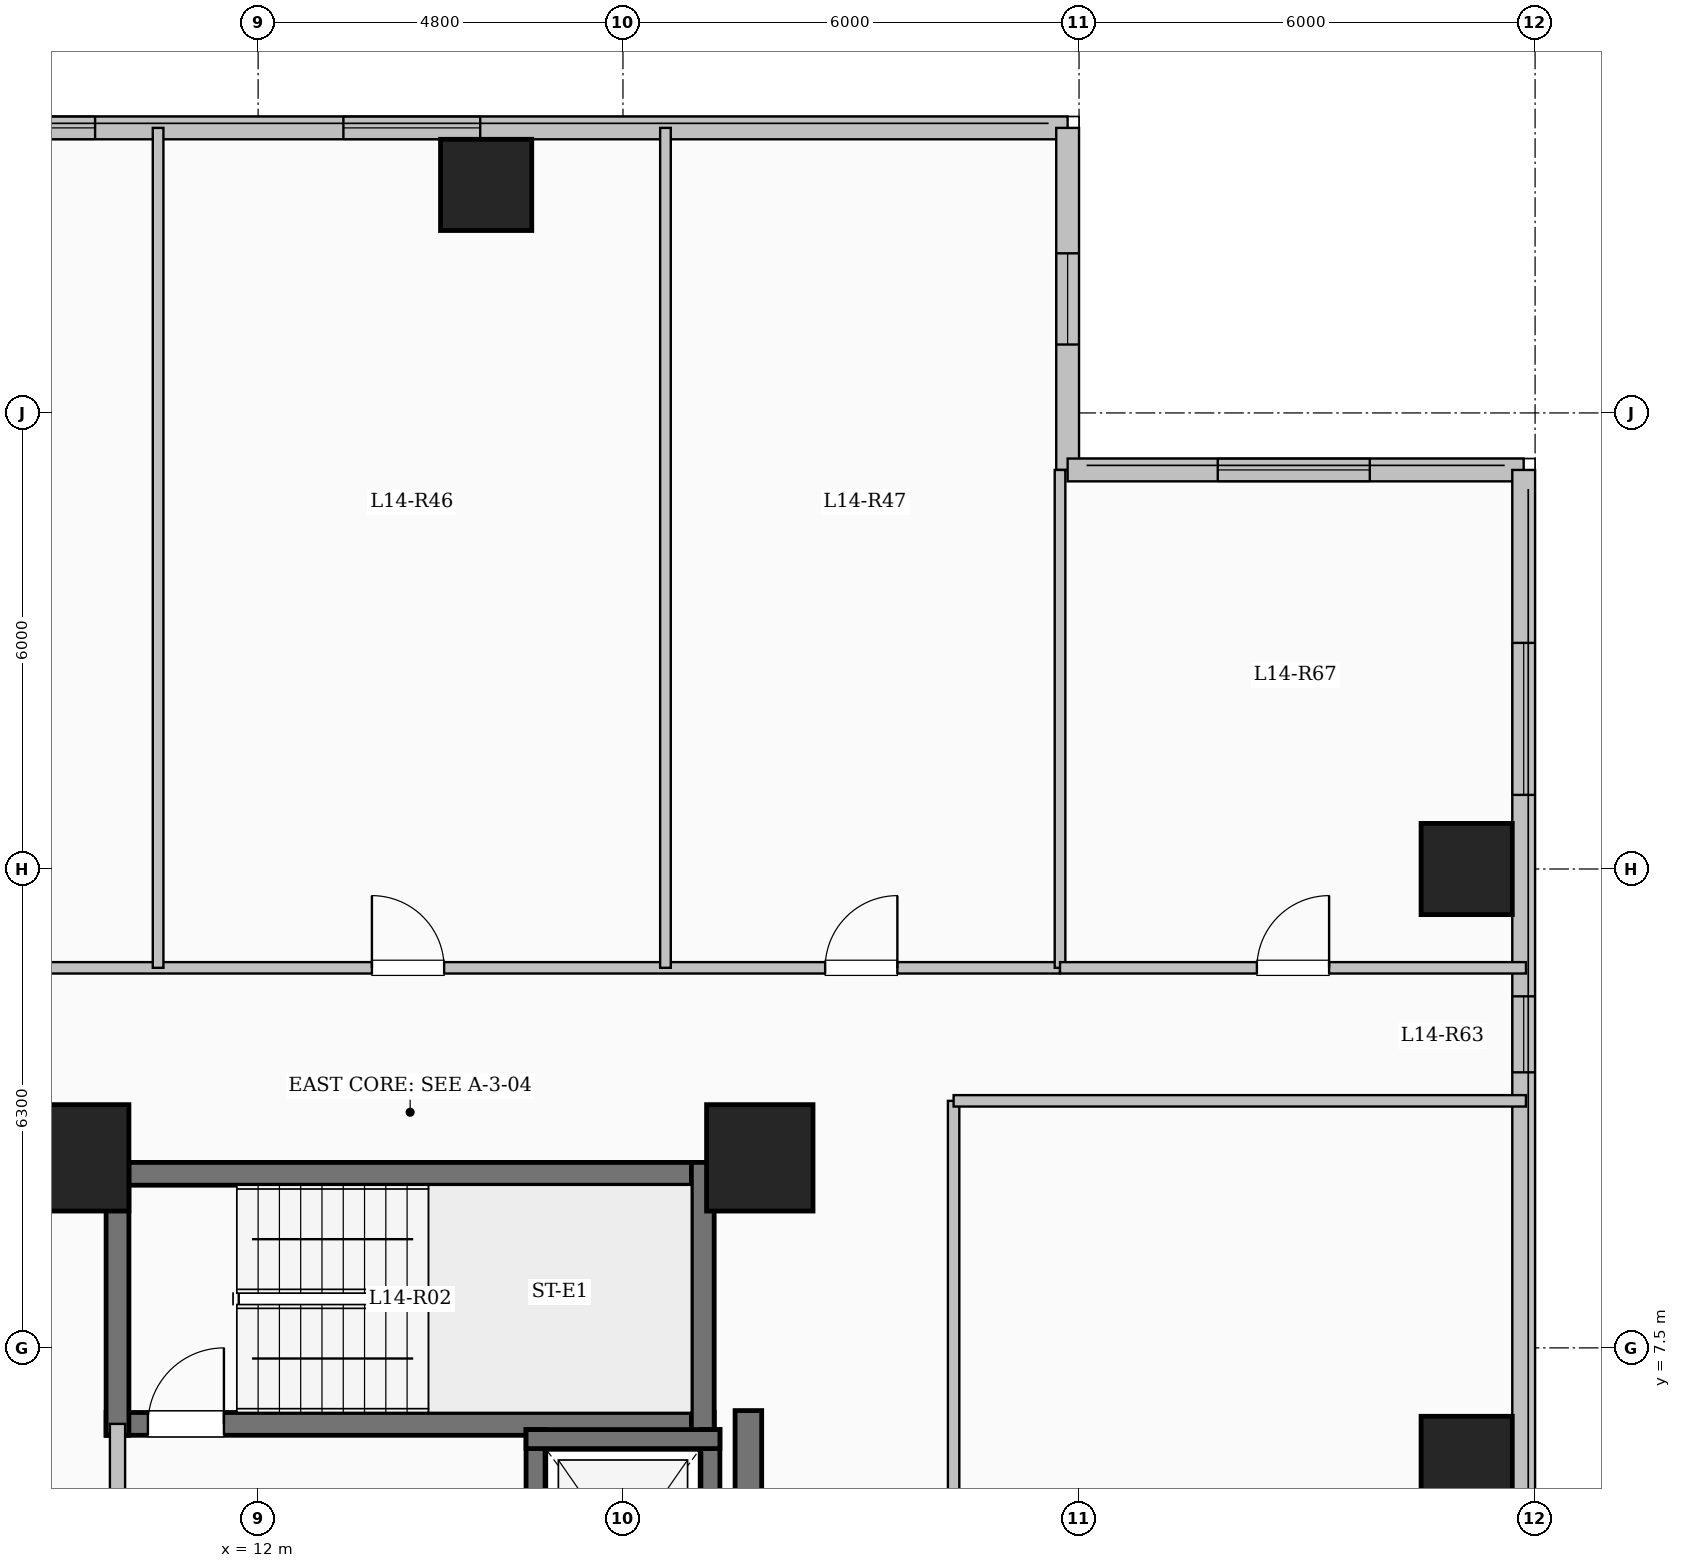
"""IFC4 building model, lengths in metres.
Left out: names, types, materials, properties, quantities, classifications, styles, units other than length and angle.
Written with IfcOpenShell. Run it as: python <this file> out.ifc"""

import sys

from ifc_helpers import new_model, si_unit, direction, frame, frame_2d, origin, origin_2d, place, context, subcontext, project, spatial, rectangle, extrude, element, fill, save


model = new_model("IFC4")
c1 = context("Model", 3, precision=1e-05, world=origin(), true_north=direction((0.0, 1.0)))
c2 = subcontext(c1, "Body", "Model", "MODEL_VIEW")
j1 = project(units=[si_unit("LENGTHUNIT", "METRE"), si_unit("PLANEANGLEUNIT", "RADIAN")], contexts=[c1])
p1 = place(None, origin())
s1 = spatial("IfcSite", under=j1, at=p1, CompositionType="ELEMENT")
p2 = place(p1, origin())
s2 = spatial("IfcBuilding", under=s1, at=p2, CompositionType="ELEMENT")
p3 = place(p2, frame((0.0, 0.0, 54.15)))
s3 = spatial("IfcBuildingStorey", under=s2, at=p3, CompositionType="ELEMENT", Elevation=54.15)
for number, where, z_axis, x_axis in (
    (1, (9.6, 10.0, 0.0), (0.0, 0.0, 1.0), (1.0, 0.0, 0.0)),
    (2, (18.6, 10.0, 0.0), (0.0, 0.0, 1.0), (1.0, 0.0, 0.0)),
):
    element("IfcColumn", number, at=place(p3, frame(where, z_axis=z_axis, x_axis=x_axis)), inside=s3, PredefinedType="COLUMN", context=c2, shape_type="SweptSolid", body=[
        extrude(rectangle(XDim=1.4, YDim=1.4, at=origin_2d()), origin(), (0.0, 0.0, 1.0), 3.35),
    ])
for number, where, z_axis, x_axis in (
    (3, (15.0, 22.8, 0.0), (0.0, 0.0, 1.0), (1.0, 0.0, 0.0)),
    (4, (27.9, 6.0, 0.0), (0.0, 0.0, 1.0), (1.0, 0.0, 0.0)),
    (5, (27.9, 13.8, 0.0), (0.0, 0.0, 1.0), (1.0, 0.0, 0.0)),
):
    element("IfcColumn", number, at=place(p3, frame(where, z_axis=z_axis, x_axis=x_axis)), inside=s3, PredefinedType="COLUMN", context=c2, shape_type="SweptSolid", body=[
        extrude(rectangle(XDim=1.2, YDim=1.2, at=origin_2d()), origin(), (0.0, 0.0, 1.0), 3.35),
    ])
p4 = place(p3, frame((7.35, 23.55, 0.0), z_axis=(0.0, 0.0, 1.0), x_axis=(1.0, 0.0, 0.0)))
e6 = element("IfcWall", 6, at=p4, inside=s3, PredefinedType="SOLIDWALL", context=c2, shape_type="SweptSolid", body=[
    extrude(rectangle(XDim=15.3, YDim=0.3, at=frame_2d((7.65, 0.0))), origin(), (0.0, 0.0, 1.0), 3.1),
])
p5 = place(p4, frame((0.705, 0.0, 0.9)))
e7 = element("IfcOpeningElement", 7, at=p5, cuts=e6, PredefinedType="OPENING", context=c2, shape_type="SweptSolid", body=[
    extrude(rectangle(XDim=1.8, YDim=1.65, at=frame_2d((0.9, 0.825))), frame((0.0, 0.16, 0.0), z_axis=(0.0, -1.0, 0.0), x_axis=(1.0, 0.0, 0.0)), (0.0, 0.0, 1.0), 0.32),
])
p6 = place(p4, frame((5.772, 0.0, 0.9)))
e8 = element("IfcOpeningElement", 8, at=p6, cuts=e6, PredefinedType="OPENING", context=c2, shape_type="SweptSolid", body=[
    extrude(rectangle(XDim=1.8, YDim=1.65, at=frame_2d((0.9, 0.825))), frame((0.0, 0.16, 0.0), z_axis=(0.0, -1.0, 0.0), x_axis=(1.0, 0.0, 0.0)), (0.0, 0.0, 1.0), 0.32),
])
p7 = place(p3, frame((22.65, 23.55, 0.0), z_axis=(0.0, 0.0, 1.0), x_axis=(0.0, -1.0, 0.0)))
e9 = element("IfcWall", 9, at=p7, inside=s3, PredefinedType="SOLIDWALL", context=c2, shape_type="SweptSolid", body=[
    extrude(rectangle(XDim=4.5, YDim=0.3, at=frame_2d((2.25, 0.0))), origin(), (0.0, 0.0, 1.0), 3.1),
])
p8 = place(p7, frame((1.65, 0.0, 0.95)))
e10 = element("IfcOpeningElement", 10, at=p8, cuts=e9, PredefinedType="OPENING", context=c2, shape_type="SweptSolid", body=[
    extrude(rectangle(XDim=1.2, YDim=1.5, at=frame_2d((0.6, 0.75))), frame((0.0, 0.16, 0.0), z_axis=(0.0, -1.0, 0.0), x_axis=(1.0, 0.0, 0.0)), (0.0, 0.0, 1.0), 0.32),
])
p9 = place(p3, frame((22.65, 19.05, 0.0), z_axis=(0.0, 0.0, 1.0), x_axis=(1.0, 0.0, 0.0)))
e11 = element("IfcWall", 11, at=p9, inside=s3, PredefinedType="SOLIDWALL", context=c2, shape_type="SweptSolid", body=[
    extrude(rectangle(XDim=6.0, YDim=0.3, at=frame_2d((3.0, 0.0))), origin(), (0.0, 0.0, 1.0), 3.1),
])
p10 = place(p9, frame((1.975, 0.0, 0.9)))
e12 = element("IfcOpeningElement", 12, at=p10, cuts=e11, PredefinedType="OPENING", context=c2, shape_type="SweptSolid", body=[
    extrude(rectangle(XDim=2.0, YDim=1.7, at=frame_2d((1.0, 0.85))), frame((0.0, 0.16, 0.0), z_axis=(0.0, -1.0, 0.0), x_axis=(1.0, 0.0, 0.0)), (0.0, 0.0, 1.0), 0.32),
])
p11 = place(p3, frame((28.65, 19.05, 0.0), z_axis=(0.0, 0.0, 1.0), x_axis=(0.0, -1.0, 0.0)))
e13 = element("IfcWall", 13, at=p11, inside=s3, PredefinedType="SOLIDWALL", context=c2, shape_type="SweptSolid", body=[
    extrude(rectangle(XDim=38.1, YDim=0.3, at=frame_2d((19.05, 0.0))), origin(), (0.0, 0.0, 1.0), 3.1),
])
p12 = place(p11, frame((2.275, 0.0, 0.9)))
e14 = element("IfcOpeningElement", 14, at=p12, cuts=e13, PredefinedType="OPENING", context=c2, shape_type="SweptSolid", body=[
    extrude(rectangle(XDim=2.0, YDim=1.7, at=frame_2d((1.0, 0.85))), frame((0.0, 0.16, 0.0), z_axis=(0.0, -1.0, 0.0), x_axis=(1.0, 0.0, 0.0)), (0.0, 0.0, 1.0), 0.32),
])
p13 = place(p11, frame((6.925, 0.0, 0.95)))
e15 = element("IfcOpeningElement", 15, at=p13, cuts=e13, PredefinedType="OPENING", context=c2, shape_type="SweptSolid", body=[
    extrude(rectangle(XDim=1.0, YDim=1.5, at=frame_2d((0.5, 0.75))), frame((0.0, 0.16, 0.0), z_axis=(0.0, -1.0, 0.0), x_axis=(1.0, 0.0, 0.0)), (0.0, 0.0, 1.0), 0.32),
])
p14 = place(p11, frame((16.3, 0.0, 0.9)))
e16 = element("IfcOpeningElement", 16, at=p14, cuts=e13, PredefinedType="OPENING", context=c2, shape_type="SweptSolid", body=[
    extrude(rectangle(XDim=2.0, YDim=1.7, at=frame_2d((1.0, 0.85))), frame((0.0, 0.16, 0.0), z_axis=(0.0, -1.0, 0.0), x_axis=(1.0, 0.0, 0.0)), (0.0, 0.0, 1.0), 0.32),
])
p15 = place(p11, frame((27.058, 0.0, 0.9)))
e17 = element("IfcOpeningElement", 17, at=p15, cuts=e13, PredefinedType="OPENING", context=c2, shape_type="SweptSolid", body=[
    extrude(rectangle(XDim=1.5, YDim=1.65, at=frame_2d((0.75, 0.825))), frame((0.0, 0.16, 0.0), z_axis=(0.0, -1.0, 0.0), x_axis=(1.0, 0.0, 0.0)), (0.0, 0.0, 1.0), 0.32),
])
p16 = place(p11, frame((32.55, 0.0, 0.9)))
e18 = element("IfcOpeningElement", 18, at=p16, cuts=e13, PredefinedType="OPENING", context=c2, shape_type="SweptSolid", body=[
    extrude(rectangle(XDim=2.4, YDim=1.8, at=frame_2d((1.2, 0.9))), frame((0.0, 0.16, 0.0), z_axis=(0.0, -1.0, 0.0), x_axis=(1.0, 0.0, 0.0)), (0.0, 0.0, 1.0), 0.32),
])
p17 = place(p3, frame((10.0, 9.79, 0.0), z_axis=(0.0, 0.0, 1.0), x_axis=(1.0, 0.0, 0.0)))
e19 = element("IfcWall", 19, at=p17, inside=s3, PredefinedType="SHEAR", context=c2, shape_type="SweptSolid", body=[
    extrude(rectangle(XDim=8.0, YDim=0.3, at=frame_2d((4.0, 0.0))), origin(), (0.0, 0.0, 1.0), 3.35),
])
p18 = place(p3, frame((10.0, 6.5, 0.0), z_axis=(0.0, 0.0, 1.0), x_axis=(1.0, 0.0, 0.0)))
e20 = element("IfcWall", 20, at=p18, inside=s3, PredefinedType="SHEAR", context=c2, shape_type="SweptSolid", body=[
    extrude(rectangle(XDim=8.0, YDim=0.3, at=frame_2d((4.0, 0.0))), origin(), (0.0, 0.0, 1.0), 3.35),
])
p19 = place(p18, frame((0.55, 0.0, 0.0)))
e21 = element("IfcOpeningElement", 21, at=p19, cuts=e20, PredefinedType="OPENING", context=c2, shape_type="SweptSolid", body=[
    extrude(rectangle(XDim=1.0, YDim=2.15, at=frame_2d((0.5, 1.075))), frame((0.0, 0.16, 0.0), z_axis=(0.0, -1.0, 0.0), x_axis=(1.0, 0.0, 0.0)), (0.0, 0.0, 1.0), 0.32),
])
for number, where, z_axis, x_axis in (
    (22, (10.15, 6.35, 0.0), (0.0, 0.0, 1.0), (0.0, 1.0, 0.0)),
    (23, (17.85, 6.35, 0.0), (0.0, 0.0, 1.0), (0.0, 1.0, 0.0)),
):
    element("IfcWall", number, at=place(p3, frame(where, z_axis=z_axis, x_axis=x_axis)), inside=s3, PredefinedType="SHEAR", context=c2, shape_type="SweptSolid", body=[
        extrude(rectangle(XDim=3.59, YDim=0.3, at=frame_2d((1.795, 0.0))), origin(), (0.0, 0.0, 1.0), 3.35),
    ])
p20 = place(p3, frame((10.15, 3.25, 0.0), z_axis=(0.0, 0.0, 1.0), x_axis=(0.0, 1.0, 0.0)))
e24 = element("IfcWall", 24, at=p20, inside=s3, PredefinedType="SOLIDWALL", context=c2, shape_type="SweptSolid", body=[
    extrude(rectangle(XDim=3.25, YDim=0.2, at=frame_2d((1.625, 0.0))), origin(), (0.0, 0.0, 1.0), 3.1),
])
p21 = place(p20, frame((1.1, 0.0, 0.0)))
e25 = element("IfcOpeningElement", 25, at=p21, cuts=e24, PredefinedType="OPENING", context=c2, shape_type="SweptSolid", body=[
    extrude(rectangle(XDim=1.02, YDim=2.15, at=frame_2d((0.51, 1.075))), frame((0.0, 0.11, 0.0), z_axis=(0.0, -1.0, 0.0), x_axis=(1.0, 0.0, 0.0)), (0.0, 0.0, 1.0), 0.22),
])
p22 = place(p3, frame((15.65, 3.175, 0.0), z_axis=(0.0, 0.0, 1.0), x_axis=(0.0, 1.0, 0.0)))
e26 = element("IfcWall", 26, at=p22, inside=s3, PredefinedType="SHEAR", context=c2, shape_type="SweptSolid", body=[
    extrude(rectangle(XDim=3.25, YDim=0.25, at=frame_2d((1.625, 0.0))), origin(), (0.0, 0.0, 1.0), 3.35),
])
p23 = place(p22, frame((1.075, 0.0, 0.0)))
e27 = element("IfcOpeningElement", 27, at=p23, cuts=e26, PredefinedType="OPENING", context=c2, shape_type="SweptSolid", body=[
    extrude(rectangle(XDim=1.1, YDim=2.15, at=frame_2d((0.55, 1.075))), frame((0.0, 0.135, 0.0), z_axis=(0.0, -1.0, 0.0), x_axis=(1.0, 0.0, 0.0)), (0.0, 0.0, 1.0), 0.27),
])
p24 = place(p3, frame((17.95, 3.175, 0.0), z_axis=(0.0, 0.0, 1.0), x_axis=(0.0, 1.0, 0.0)))
e28 = element("IfcWall", 28, at=p24, inside=s3, PredefinedType="SHEAR", context=c2, shape_type="SweptSolid", body=[
    extrude(rectangle(XDim=3.25, YDim=0.25, at=frame_2d((1.625, 0.0))), origin(), (0.0, 0.0, 1.0), 3.35),
])
p25 = place(p3, frame((15.525, 6.3, 0.0), z_axis=(0.0, 0.0, 1.0), x_axis=(1.0, 0.0, 0.0)))
e29 = element("IfcWall", 29, at=p25, inside=s3, PredefinedType="SHEAR", context=c2, shape_type="SweptSolid", body=[
    extrude(rectangle(XDim=2.55, YDim=0.25, at=frame_2d((1.275, 0.0))), origin(), (0.0, 0.0, 1.0), 3.35),
])
p26 = place(p3, frame((18.45, -7.375, 0.0), z_axis=(0.0, 0.0, 1.0), x_axis=(0.0, 1.0, 0.0)))
e30 = element("IfcWall", 30, at=p26, inside=s3, PredefinedType="SHEAR", context=c2, shape_type="SweptSolid", body=[
    extrude(rectangle(XDim=14.05, YDim=0.35, at=frame_2d((7.025, 0.0))), origin(), (0.0, 0.0, 1.0), 3.35),
])
p27 = place(p3, frame((3.85, 12.5, 0.0), z_axis=(0.0, 0.0, 1.0), x_axis=(1.0, 0.0, 0.0)))
e31 = element("IfcWall", 31, at=p27, inside=s3, PredefinedType="PARTITIONING", context=c2, shape_type="SweptSolid", body=[
    extrude(rectangle(XDim=18.7, YDim=0.15, at=frame_2d((9.35, 0.0))), origin(), (0.0, 0.0, 1.0), 3.1),
])
p28 = place(p27, frame((2.942, 0.0, 0.0)))
e32 = element("IfcOpeningElement", 32, at=p28, cuts=e31, PredefinedType="OPENING", context=c2, shape_type="SweptSolid", body=[
    extrude(rectangle(XDim=0.95, YDim=2.15, at=frame_2d((0.475, 1.075))), frame((0.0, 0.085, 0.0), z_axis=(0.0, -1.0, 0.0), x_axis=(1.0, 0.0, 0.0)), (0.0, 0.0, 1.0), 0.17),
])
p29 = place(p27, frame((9.647, 0.0, 0.0)))
e33 = element("IfcOpeningElement", 33, at=p29, cuts=e31, PredefinedType="OPENING", context=c2, shape_type="SweptSolid", body=[
    extrude(rectangle(XDim=0.95, YDim=2.15, at=frame_2d((0.475, 1.075))), frame((0.0, 0.085, 0.0), z_axis=(0.0, -1.0, 0.0), x_axis=(1.0, 0.0, 0.0)), (0.0, 0.0, 1.0), 0.17),
])
p30 = place(p27, frame((15.61, 0.0, 0.0)))
e34 = element("IfcOpeningElement", 34, at=p30, cuts=e31, PredefinedType="OPENING", context=c2, shape_type="SweptSolid", body=[
    extrude(rectangle(XDim=0.95, YDim=2.15, at=frame_2d((0.475, 1.075))), frame((0.0, 0.085, 0.0), z_axis=(0.0, -1.0, 0.0), x_axis=(1.0, 0.0, 0.0)), (0.0, 0.0, 1.0), 0.17),
])
p31 = place(p3, frame((21.15, -7.25, 0.0), z_axis=(0.0, 0.0, 1.0), x_axis=(0.0, 1.0, 0.0)))
e35 = element("IfcWall", 35, at=p31, inside=s3, PredefinedType="PARTITIONING", context=c2, shape_type="SweptSolid", body=[
    extrude(rectangle(XDim=18.0, YDim=0.15, at=frame_2d((9.0, 0.0))), origin(), (0.0, 0.0, 1.0), 2.585),
])
for number, where, z_axis, x_axis in (
    (36, (10.684, 12.5, 0.0), (0.0, 0.0, 1.0), (0.0, 1.0, 0.0)),
    (37, (17.359, 12.5, 0.0), (0.0, 0.0, 1.0), (0.0, 1.0, 0.0)),
):
    element("IfcWall", number, at=place(p3, frame(where, z_axis=z_axis, x_axis=x_axis)), inside=s3, PredefinedType="PARTITIONING", context=c2, shape_type="SweptSolid", body=[
        extrude(rectangle(XDim=11.05, YDim=0.14, at=frame_2d((5.525, 0.0))), origin(), (0.0, 0.0, 1.0), 3.1),
    ])
p32 = place(p3, frame((21.15, 10.75, 0.0), z_axis=(0.0, 0.0, 1.0), x_axis=(1.0, 0.0, 0.0)))
e38 = element("IfcWall", 38, at=p32, inside=s3, PredefinedType="PARTITIONING", context=c2, shape_type="SweptSolid", body=[
    extrude(rectangle(XDim=7.53, YDim=0.15, at=frame_2d((3.765, 0.0))), origin(), (0.0, 0.0, 1.0), 3.1),
])
p33 = place(p3, frame((22.55, 12.5, 0.0), z_axis=(0.0, 0.0, 1.0), x_axis=(0.0, 1.0, 0.0)))
e39 = element("IfcWall", 39, at=p33, inside=s3, PredefinedType="PARTITIONING", context=c2, shape_type="SweptSolid", body=[
    extrude(rectangle(XDim=6.55, YDim=0.14, at=frame_2d((3.275, 0.0))), origin(), (0.0, 0.0, 1.0), 3.1),
])
p34 = place(p3, frame((22.55, 12.5, 0.0), z_axis=(0.0, 0.0, 1.0), x_axis=(1.0, 0.0, 0.0)))
e40 = element("IfcWall", 40, at=p34, inside=s3, PredefinedType="PARTITIONING", context=c2, shape_type="SweptSolid", body=[
    extrude(rectangle(XDim=6.13, YDim=0.15, at=frame_2d((3.065, 0.0))), origin(), (0.0, 0.0, 1.0), 3.1),
])
p35 = place(p34, frame((2.59, 0.0, 0.0)))
e41 = element("IfcOpeningElement", 41, at=p35, cuts=e40, PredefinedType="OPENING", context=c2, shape_type="SweptSolid", body=[
    extrude(rectangle(XDim=0.95, YDim=2.15, at=frame_2d((0.475, 1.075))), frame((0.0, 0.085, 0.0), z_axis=(0.0, -1.0, 0.0), x_axis=(1.0, 0.0, 0.0)), (0.0, 0.0, 1.0), 0.17),
])
p36 = place(p5, origin())
e42 = element("IfcWindow", 42, at=p36, inside=s3, PartitioningType="SINGLE_PANEL", PredefinedType="WINDOW", context=c2, shape_type="SweptSolid", body=[
    extrude(rectangle(XDim=1.8, YDim=1.65, at=frame_2d((0.9, 0.825))), frame((0.0, 0.03, 0.0), z_axis=(0.0, -1.0, 0.0), x_axis=(1.0, 0.0, 0.0)), (0.0, 0.0, 1.0), 0.06),
])
fill(e7, e42)
p37 = place(p6, origin())
e43 = element("IfcWindow", 43, at=p37, inside=s3, PartitioningType="SINGLE_PANEL", PredefinedType="WINDOW", context=c2, shape_type="SweptSolid", body=[
    extrude(rectangle(XDim=1.8, YDim=1.65, at=frame_2d((0.9, 0.825))), frame((0.0, 0.03, 0.0), z_axis=(0.0, -1.0, 0.0), x_axis=(1.0, 0.0, 0.0)), (0.0, 0.0, 1.0), 0.06),
])
fill(e8, e43)
p38 = place(p8, origin())
e44 = element("IfcWindow", 44, at=p38, inside=s3, PartitioningType="SINGLE_PANEL", PredefinedType="WINDOW", context=c2, shape_type="SweptSolid", body=[
    extrude(rectangle(XDim=1.2, YDim=1.5, at=frame_2d((0.6, 0.75))), frame((0.0, 0.03, 0.0), z_axis=(0.0, -1.0, 0.0), x_axis=(1.0, 0.0, 0.0)), (0.0, 0.0, 1.0), 0.06),
])
fill(e10, e44)
p39 = place(p10, origin())
e45 = element("IfcWindow", 45, at=p39, inside=s3, PartitioningType="SINGLE_PANEL", PredefinedType="WINDOW", context=c2, shape_type="SweptSolid", body=[
    extrude(rectangle(XDim=2.0, YDim=1.7, at=frame_2d((1.0, 0.85))), frame((0.0, 0.03, 0.0), z_axis=(0.0, -1.0, 0.0), x_axis=(1.0, 0.0, 0.0)), (0.0, 0.0, 1.0), 0.06),
])
fill(e12, e45)
p40 = place(p12, origin())
e46 = element("IfcWindow", 46, at=p40, inside=s3, PartitioningType="SINGLE_PANEL", PredefinedType="WINDOW", context=c2, shape_type="SweptSolid", body=[
    extrude(rectangle(XDim=2.0, YDim=1.7, at=frame_2d((1.0, 0.85))), frame((0.0, 0.03, 0.0), z_axis=(0.0, -1.0, 0.0), x_axis=(1.0, 0.0, 0.0)), (0.0, 0.0, 1.0), 0.06),
])
fill(e14, e46)
p41 = place(p13, origin())
e47 = element("IfcWindow", 47, at=p41, inside=s3, PartitioningType="SINGLE_PANEL", PredefinedType="WINDOW", context=c2, shape_type="SweptSolid", body=[
    extrude(rectangle(XDim=1.0, YDim=1.5, at=frame_2d((0.5, 0.75))), frame((0.0, 0.03, 0.0), z_axis=(0.0, -1.0, 0.0), x_axis=(1.0, 0.0, 0.0)), (0.0, 0.0, 1.0), 0.06),
])
fill(e15, e47)
p42 = place(p19, origin())
e48 = element("IfcDoor", 48, at=p42, inside=s3, OperationType="SINGLE_SWING_RIGHT", PredefinedType="DOOR", context=c2, shape_type="SweptSolid", body=[
    extrude(rectangle(XDim=1.0, YDim=2.15, at=frame_2d((0.5, 1.075))), frame((0.0, 0.025, 0.0), z_axis=(0.0, -1.0, 0.0), x_axis=(1.0, 0.0, 0.0)), (0.0, 0.0, 1.0), 0.05),
])
fill(e21, e48)
p43 = place(p29, origin())
e49 = element("IfcDoor", 49, at=p43, inside=s3, OperationType="SINGLE_SWING_LEFT", PredefinedType="DOOR", context=c2, shape_type="SweptSolid", body=[
    extrude(rectangle(XDim=0.95, YDim=2.15, at=frame_2d((0.475, 1.075))), frame((0.0, 0.025, 0.0), z_axis=(0.0, -1.0, 0.0), x_axis=(1.0, 0.0, 0.0)), (0.0, 0.0, 1.0), 0.05),
])
fill(e33, e49)
p44 = place(p30, origin())
e50 = element("IfcDoor", 50, at=p44, inside=s3, OperationType="SINGLE_SWING_RIGHT", PredefinedType="DOOR", context=c2, shape_type="SweptSolid", body=[
    extrude(rectangle(XDim=0.95, YDim=2.15, at=frame_2d((0.475, 1.075))), frame((0.0, 0.025, 0.0), z_axis=(0.0, -1.0, 0.0), x_axis=(1.0, 0.0, 0.0)), (0.0, 0.0, 1.0), 0.05),
])
fill(e34, e50)
p45 = place(p35, origin())
e51 = element("IfcDoor", 51, at=p45, inside=s3, OperationType="SINGLE_SWING_RIGHT", PredefinedType="DOOR", context=c2, shape_type="SweptSolid", body=[
    extrude(rectangle(XDim=0.95, YDim=2.15, at=frame_2d((0.475, 1.075))), frame((0.0, 0.025, 0.0), z_axis=(0.0, -1.0, 0.0), x_axis=(1.0, 0.0, 0.0)), (0.0, 0.0, 1.0), 0.05),
])
fill(e41, e51)
save(model, sys.argv[1])
